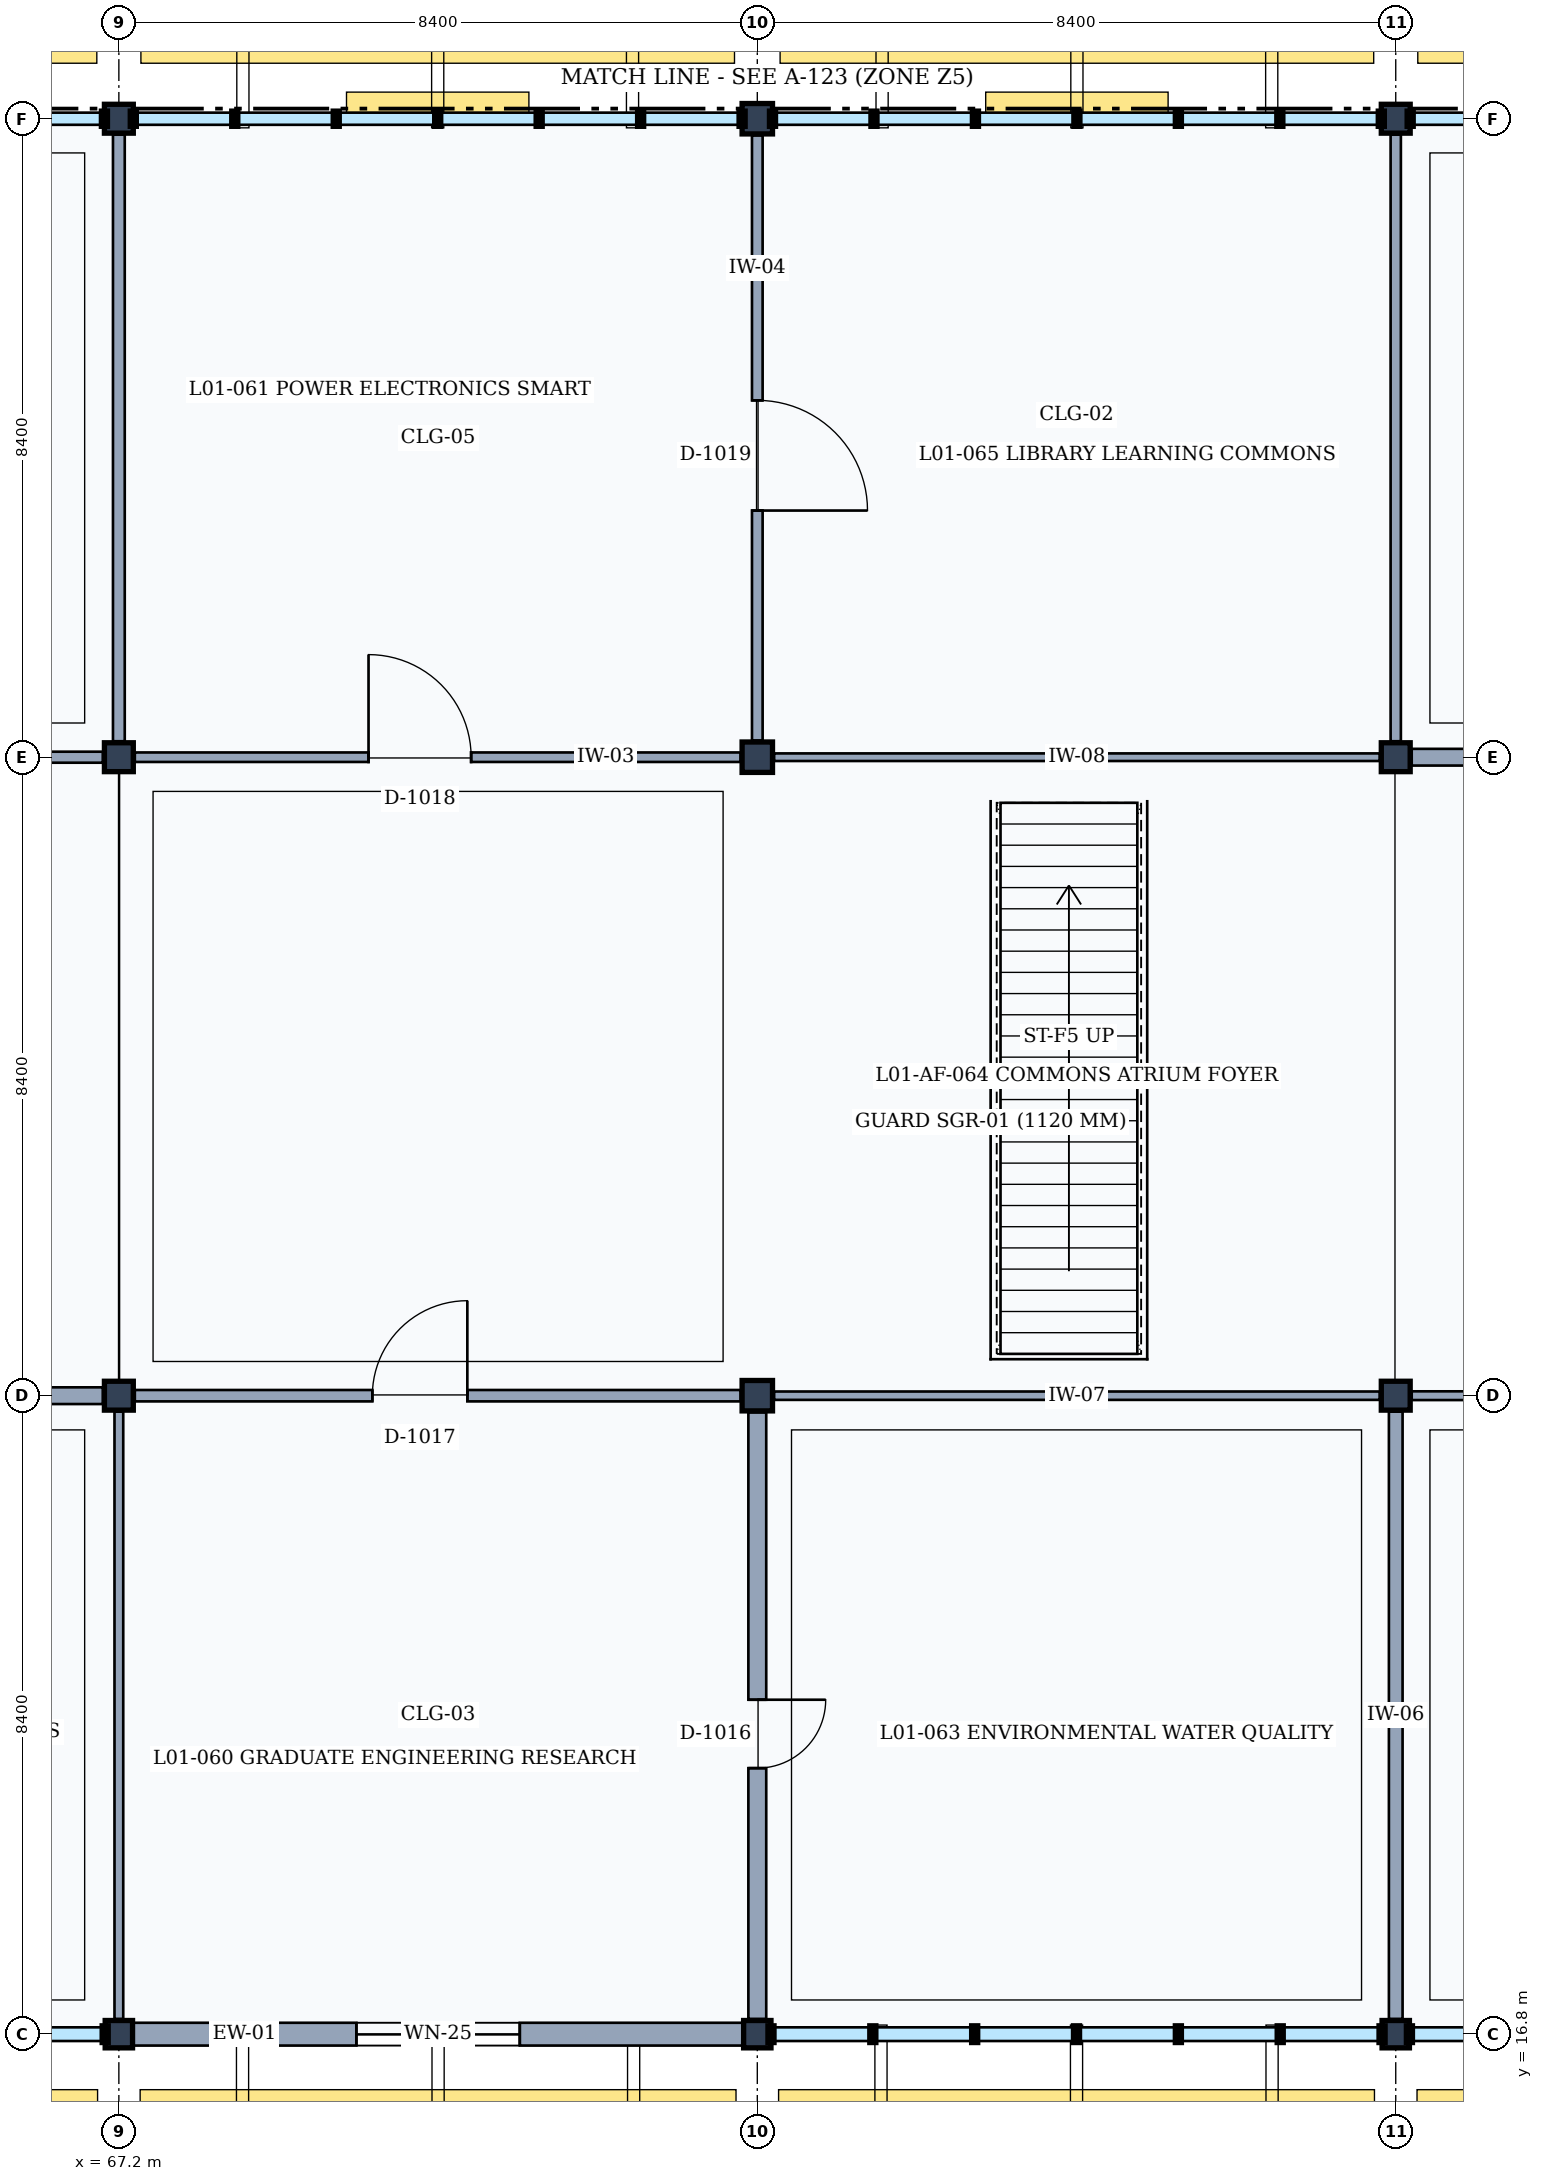
"""IFC4 building model, lengths in metres.
Left out: names, types, materials, properties, quantities, classifications, styles, units other than length and angle.
Written with IfcOpenShell. Run it as: python <this file> out.ifc"""

import sys

from ifc_helpers import new_model, si_unit, direction, frame, frame_2d, origin, origin_2d, place, context, subcontext, project, spatial, rectangle, extrude, element, fill, save


model = new_model("IFC4")
c1 = context("Model", 3, precision=1e-05, world=origin(), true_north=direction((0.0, 1.0)))
c2 = subcontext(c1, "Body", "Model", "MODEL_VIEW")
j1 = project(units=[si_unit("LENGTHUNIT", "METRE"), si_unit("PLANEANGLEUNIT", "RADIAN")], contexts=[c1])
p1 = place(None, origin())
s1 = spatial("IfcSite", under=j1, at=p1, CompositionType="ELEMENT")
p2 = place(p1, origin())
s2 = spatial("IfcBuilding", under=s1, at=p2, CompositionType="ELEMENT")
p3 = place(p2, frame((0.0, 0.0, 4.8)))
s3 = spatial("IfcBuildingStorey", under=s2, at=p3, CompositionType="ELEMENT", Elevation=4.8)
p4 = place(p3, frame((67.2, 16.8, 0.0), z_axis=(0.0, 0.0, 1.0), x_axis=(1.0, 0.0, 0.0)))
e1 = element("IfcColumn", 1, at=p4, inside=s3, PredefinedType="COLUMN", context=c2, shape_type="SweptSolid", body=[
    extrude(rectangle(XDim=0.36, YDim=0.36, at=origin_2d()), origin(), (0.0, 0.0, 1.0), 4.8),
])
for number, where, z_axis, x_axis in (
    (2, (67.2, 25.2, 0.0), (0.0, 0.0, 1.0), (1.0, 0.0, 0.0)),
    (3, (67.2, 33.6, 0.0), (0.0, 0.0, 1.0), (1.0, 0.0, 0.0)),
    (4, (67.2, 42.0, 0.0), (0.0, 0.0, 1.0), (1.0, 0.0, 0.0)),
):
    element("IfcColumn", number, at=place(p3, frame(where, z_axis=z_axis, x_axis=x_axis)), inside=s3, PredefinedType="COLUMN", context=c2, shape_type="SweptSolid", body=[
        extrude(rectangle(XDim=0.38, YDim=0.38, at=origin_2d()), origin(), (0.0, 0.0, 1.0), 4.8),
    ])
p5 = place(p3, frame((75.6, 16.8, 0.0), z_axis=(0.0, 0.0, 1.0), x_axis=(1.0, 0.0, 0.0)))
e5 = element("IfcColumn", 5, at=p5, inside=s3, PredefinedType="COLUMN", context=c2, shape_type="SweptSolid", body=[
    extrude(rectangle(XDim=0.36, YDim=0.36, at=origin_2d()), origin(), (0.0, 0.0, 1.0), 4.8),
])
for number, where, z_axis, x_axis in (
    (6, (75.6, 25.2, 0.0), (0.0, 0.0, 1.0), (1.0, 0.0, 0.0)),
    (7, (75.6, 33.6, 0.0), (0.0, 0.0, 1.0), (1.0, 0.0, 0.0)),
    (8, (75.6, 42.0, 0.0), (0.0, 0.0, 1.0), (1.0, 0.0, 0.0)),
):
    element("IfcColumn", number, at=place(p3, frame(where, z_axis=z_axis, x_axis=x_axis)), inside=s3, PredefinedType="COLUMN", context=c2, shape_type="SweptSolid", body=[
        extrude(rectangle(XDim=0.4, YDim=0.4, at=origin_2d()), origin(), (0.0, 0.0, 1.0), 4.8),
    ])
p6 = place(p3, frame((84.0, 16.8, 0.0), z_axis=(0.0, 0.0, 1.0), x_axis=(1.0, 0.0, 0.0)))
e9 = element("IfcColumn", 9, at=p6, inside=s3, PredefinedType="COLUMN", context=c2, shape_type="SweptSolid", body=[
    extrude(rectangle(XDim=0.36, YDim=0.36, at=origin_2d()), origin(), (0.0, 0.0, 1.0), 4.8),
])
for number, where, z_axis, x_axis in (
    (10, (84.0, 25.2, 0.0), (0.0, 0.0, 1.0), (1.0, 0.0, 0.0)),
    (11, (84.0, 33.6, 0.0), (0.0, 0.0, 1.0), (1.0, 0.0, 0.0)),
    (12, (84.0, 42.0, 0.0), (0.0, 0.0, 1.0), (1.0, 0.0, 0.0)),
):
    element("IfcColumn", number, at=place(p3, frame(where, z_axis=z_axis, x_axis=x_axis)), inside=s3, PredefinedType="COLUMN", context=c2, shape_type="SweptSolid", body=[
        extrude(rectangle(XDim=0.38, YDim=0.38, at=origin_2d()), origin(), (0.0, 0.0, 1.0), 4.8),
    ])
p7 = place(p3, frame((75.42, 16.8, 0.0), z_axis=(0.0, 0.0, 1.0), x_axis=(-1.0, 0.0, 0.0)))
e13 = element("IfcWall", 13, at=p7, inside=s3, PredefinedType="SOLIDWALL", context=c2, shape_type="SweptSolid", body=[
    extrude(rectangle(XDim=8.04, YDim=0.3, at=frame_2d((4.02, 0.0))), origin(), (0.0, 0.0, 1.0), 3.96),
])
p8 = place(p7, frame((2.945, 0.0, 0.9)))
e14 = element("IfcOpeningElement", 14, at=p8, cuts=e13, PredefinedType="OPENING", context=c2, shape_type="SweptSolid", body=[
    extrude(rectangle(XDim=2.15, YDim=1.85, at=frame_2d((1.075, 0.925))), frame((0.0, 0.16, 0.0), z_axis=(0.0, -1.0, 0.0), x_axis=(1.0, 0.0, 0.0)), (0.0, 0.0, 1.0), 0.32),
])
p9 = place(p3, frame((67.2, 17.0, 0.0), z_axis=(0.0, 0.0, 1.0), x_axis=(0.0, 1.0, 0.0)))
e15 = element("IfcWall", 15, at=p9, inside=s3, PredefinedType="PARTITIONING", context=c2, shape_type="SweptSolid", body=[
    extrude(rectangle(XDim=7.99, YDim=0.115, at=frame_2d((3.995, 0.0))), origin(), (0.0, 0.0, 1.0), 3.92),
])
p10 = place(p3, frame((59.03, 25.2, 0.0), z_axis=(0.0, 0.0, 1.0), x_axis=(1.0, 0.0, 0.0)))
e16 = element("IfcWall", 16, at=p10, inside=s3, PredefinedType="PARTITIONING", context=c2, shape_type="SweptSolid", body=[
    extrude(rectangle(XDim=7.96, YDim=0.22, at=frame_2d((3.98, 0.0))), origin(), (0.0, 0.0, 1.0), 3.89),
])
p11 = place(p3, frame((59.03, 33.6, 0.0), z_axis=(0.0, 0.0, 1.0), x_axis=(1.0, 0.0, 0.0)))
e17 = element("IfcWall", 17, at=p11, inside=s3, PredefinedType="PARTITIONING", context=c2, shape_type="SweptSolid", body=[
    extrude(rectangle(XDim=7.96, YDim=0.145, at=frame_2d((3.98, 0.0))), origin(), (0.0, 0.0, 1.0), 3.92),
])
p12 = place(p11, frame((2.9, 0.0, 0.0)))
e18 = element("IfcOpeningElement", 18, at=p12, cuts=e17, PredefinedType="OPENING", context=c2, shape_type="SweptSolid", body=[
    extrude(rectangle(XDim=1.7, YDim=2.3, at=frame_2d((0.85, 1.15))), frame((0.0, 0.083, 0.0), z_axis=(0.0, -1.0, 0.0), x_axis=(1.0, 0.0, 0.0)), (0.0, 0.0, 1.0), 0.165),
])
p13 = place(p3, frame((67.2, 33.81, 0.0), z_axis=(0.0, 0.0, 1.0), x_axis=(0.0, 1.0, 0.0)))
e19 = element("IfcWall", 19, at=p13, inside=s3, PredefinedType="PARTITIONING", context=c2, shape_type="SweptSolid", body=[
    extrude(rectangle(XDim=7.98, YDim=0.155, at=frame_2d((3.99, 0.0))), origin(), (0.0, 0.0, 1.0), 3.92),
])
p14 = place(p3, frame((75.6, 17.0, 0.0), z_axis=(0.0, 0.0, 1.0), x_axis=(0.0, 1.0, 0.0)))
e20 = element("IfcWall", 20, at=p14, inside=s3, PredefinedType="PARTITIONING", context=c2, shape_type="SweptSolid", body=[
    extrude(rectangle(XDim=7.98, YDim=0.235, at=frame_2d((3.99, 0.0))), origin(), (0.0, 0.0, 1.0), 3.92),
])
p15 = place(p14, frame((3.3, 0.0, 0.0)))
e21 = element("IfcOpeningElement", 21, at=p15, cuts=e20, PredefinedType="OPENING", context=c2, shape_type="SweptSolid", body=[
    extrude(rectangle(XDim=0.9, YDim=2.1, at=frame_2d((0.45, 1.05))), frame((0.0, 0.127, 0.0), z_axis=(0.0, -1.0, 0.0), x_axis=(1.0, 0.0, 0.0)), (0.0, 0.0, 1.0), 0.255),
])
p16 = place(p3, frame((67.41, 25.2, 0.0), z_axis=(0.0, 0.0, 1.0), x_axis=(1.0, 0.0, 0.0)))
e22 = element("IfcWall", 22, at=p16, inside=s3, PredefinedType="PARTITIONING", context=c2, shape_type="SweptSolid", body=[
    extrude(rectangle(XDim=7.97, YDim=0.15, at=frame_2d((3.985, 0.0))), origin(), (0.0, 0.0, 1.0), 3.89),
])
p17 = place(p16, frame((3.125, 0.0, 0.0)))
e23 = element("IfcOpeningElement", 23, at=p17, cuts=e22, PredefinedType="OPENING", context=c2, shape_type="SweptSolid", body=[
    extrude(rectangle(XDim=1.25, YDim=2.3, at=frame_2d((0.625, 1.15))), frame((0.0, 0.085, 0.0), z_axis=(0.0, -1.0, 0.0), x_axis=(1.0, 0.0, 0.0)), (0.0, 0.0, 1.0), 0.17),
])
p18 = place(p3, frame((67.41, 33.6, 0.0), z_axis=(0.0, 0.0, 1.0), x_axis=(1.0, 0.0, 0.0)))
e24 = element("IfcWall", 24, at=p18, inside=s3, PredefinedType="PARTITIONING", context=c2, shape_type="SweptSolid", body=[
    extrude(rectangle(XDim=7.97, YDim=0.125, at=frame_2d((3.985, 0.0))), origin(), (0.0, 0.0, 1.0), 3.92),
])
p19 = place(p18, frame((3.075, 0.0, 0.0)))
e25 = element("IfcOpeningElement", 25, at=p19, cuts=e24, PredefinedType="OPENING", context=c2, shape_type="SweptSolid", body=[
    extrude(rectangle(XDim=1.35, YDim=2.25, at=frame_2d((0.675, 1.125))), frame((0.0, 0.073, 0.0), z_axis=(0.0, -1.0, 0.0), x_axis=(1.0, 0.0, 0.0)), (0.0, 0.0, 1.0), 0.145),
])
p20 = place(p3, frame((75.6, 33.82, 0.0), z_axis=(0.0, 0.0, 1.0), x_axis=(0.0, 1.0, 0.0)))
e26 = element("IfcWall", 26, at=p20, inside=s3, PredefinedType="PARTITIONING", context=c2, shape_type="SweptSolid", body=[
    extrude(rectangle(XDim=7.96, YDim=0.14, at=frame_2d((3.98, 0.0))), origin(), (0.0, 0.0, 1.0), 3.92),
])
p21 = place(p20, frame((3.025, 0.0, 0.0)))
e27 = element("IfcOpeningElement", 27, at=p21, cuts=e26, PredefinedType="OPENING", context=c2, shape_type="SweptSolid", body=[
    extrude(rectangle(XDim=1.45, YDim=2.35, at=frame_2d((0.725, 1.175))), frame((0.0, 0.08, 0.0), z_axis=(0.0, -1.0, 0.0), x_axis=(1.0, 0.0, 0.0)), (0.0, 0.0, 1.0), 0.16),
])
p22 = place(p3, frame((84.0, 17.0, 0.0), z_axis=(0.0, 0.0, 1.0), x_axis=(0.0, 1.0, 0.0)))
e28 = element("IfcWall", 28, at=p22, inside=s3, PredefinedType="PARTITIONING", context=c2, shape_type="SweptSolid", body=[
    extrude(rectangle(XDim=7.99, YDim=0.18, at=frame_2d((3.995, 0.0))), origin(), (0.0, 0.0, 1.0), 3.92),
])
p23 = place(p3, frame((75.82, 25.2, 0.0), z_axis=(0.0, 0.0, 1.0), x_axis=(1.0, 0.0, 0.0)))
e29 = element("IfcWall", 29, at=p23, inside=s3, PredefinedType="PARTITIONING", context=c2, shape_type="SweptSolid", body=[
    extrude(rectangle(XDim=7.97, YDim=0.11, at=frame_2d((3.985, 0.0))), origin(), (0.0, 0.0, 1.0), 3.89),
])
p24 = place(p3, frame((75.82, 33.6, 0.0), z_axis=(0.0, 0.0, 1.0), x_axis=(1.0, 0.0, 0.0)))
e30 = element("IfcWall", 30, at=p24, inside=s3, PredefinedType="MOVABLE", context=c2, shape_type="SweptSolid", body=[
    extrude(rectangle(XDim=7.97, YDim=0.1, at=frame_2d((3.985, 0.0))), origin(), (0.0, 0.0, 1.0), 3.92),
])
p25 = place(p3, frame((84.0, 33.81, 0.0), z_axis=(0.0, 0.0, 1.0), x_axis=(0.0, 1.0, 0.0)))
e31 = element("IfcWall", 31, at=p25, inside=s3, PredefinedType="PARTITIONING", context=c2, shape_type="SweptSolid", body=[
    extrude(rectangle(XDim=7.98, YDim=0.135, at=frame_2d((3.99, 0.0))), origin(), (0.0, 0.0, 1.0), 3.92),
])
p26 = place(p3, frame((84.21, 25.2, 0.0), z_axis=(0.0, 0.0, 1.0), x_axis=(1.0, 0.0, 0.0)))
e32 = element("IfcWall", 32, at=p26, inside=s3, PredefinedType="PARTITIONING", context=c2, shape_type="SweptSolid", body=[
    extrude(rectangle(XDim=7.97, YDim=0.115, at=frame_2d((3.985, 0.0))), origin(), (0.0, 0.0, 1.0), 3.89),
])
p27 = place(p26, frame((3.275, 0.0, 0.0)))
e33 = element("IfcOpeningElement", 33, at=p27, cuts=e32, PredefinedType="OPENING", context=c2, shape_type="SweptSolid", body=[
    extrude(rectangle(XDim=0.95, YDim=2.15, at=frame_2d((0.475, 1.075))), frame((0.0, 0.067, 0.0), z_axis=(0.0, -1.0, 0.0), x_axis=(1.0, 0.0, 0.0)), (0.0, 0.0, 1.0), 0.135),
])
p28 = place(p3, frame((84.21, 33.6, 0.0), z_axis=(0.0, 0.0, 1.0), x_axis=(1.0, 0.0, 0.0)))
e34 = element("IfcWall", 34, at=p28, inside=s3, PredefinedType="PARTITIONING", context=c2, shape_type="SweptSolid", body=[
    extrude(rectangle(XDim=7.97, YDim=0.22, at=frame_2d((3.985, 0.0))), origin(), (0.0, 0.0, 1.0), 3.92),
])
p29 = place(p28, frame((2.85, 0.0, 0.0)))
e35 = element("IfcOpeningElement", 35, at=p29, cuts=e34, PredefinedType="OPENING", context=c2, shape_type="SweptSolid", body=[
    extrude(rectangle(XDim=1.8, YDim=2.3, at=frame_2d((0.9, 1.15))), frame((0.0, 0.12, 0.0), z_axis=(0.0, -1.0, 0.0), x_axis=(1.0, 0.0, 0.0)), (0.0, 0.0, 1.0), 0.24),
])
p30 = place(p8, origin())
e36 = element("IfcWindow", 36, at=p30, inside=s3, PartitioningType="SINGLE_PANEL", PredefinedType="WINDOW", context=c2, shape_type="SweptSolid", body=[
    extrude(rectangle(XDim=2.15, YDim=1.85, at=frame_2d((1.075, 0.925))), frame((0.0, 0.03, 0.0), z_axis=(0.0, -1.0, 0.0), x_axis=(1.0, 0.0, 0.0)), (0.0, 0.0, 1.0), 0.06),
])
fill(e14, e36)
p31 = place(p15, frame((0.9, 0.0, 0.0), z_axis=(0.0, 0.0, 1.0), x_axis=(-1.0, 0.0, 0.0)))
e37 = element("IfcDoor", 37, at=p31, inside=s3, OperationType="SINGLE_SWING_LEFT", PredefinedType="DOOR", context=c2, shape_type="SweptSolid", body=[
    extrude(rectangle(XDim=0.9, YDim=2.1, at=frame_2d((0.45, 1.05))), frame((0.0, 0.025, 0.0), z_axis=(0.0, -1.0, 0.0), x_axis=(1.0, 0.0, 0.0)), (0.0, 0.0, 1.0), 0.05),
])
fill(e21, e37)
p32 = place(p17, origin())
e38 = element("IfcDoor", 38, at=p32, inside=s3, OperationType="SINGLE_SWING_RIGHT", PredefinedType="DOOR", context=c2, shape_type="SweptSolid", body=[
    extrude(rectangle(XDim=1.25, YDim=2.3, at=frame_2d((0.625, 1.15))), frame((0.0, 0.025, 0.0), z_axis=(0.0, -1.0, 0.0), x_axis=(1.0, 0.0, 0.0)), (0.0, 0.0, 1.0), 0.05),
])
fill(e23, e38)
p33 = place(p19, origin())
e39 = element("IfcDoor", 39, at=p33, inside=s3, OperationType="SINGLE_SWING_LEFT", PredefinedType="DOOR", context=c2, shape_type="SweptSolid", body=[
    extrude(rectangle(XDim=1.35, YDim=2.25, at=frame_2d((0.675, 1.125))), frame((0.0, 0.025, 0.0), z_axis=(0.0, -1.0, 0.0), x_axis=(1.0, 0.0, 0.0)), (0.0, 0.0, 1.0), 0.05),
])
fill(e25, e39)
p34 = place(p21, frame((1.45, 0.0, 0.0), z_axis=(0.0, 0.0, 1.0), x_axis=(-1.0, 0.0, 0.0)))
e40 = element("IfcDoor", 40, at=p34, inside=s3, OperationType="SINGLE_SWING_RIGHT", PredefinedType="DOOR", context=c2, shape_type="SweptSolid", body=[
    extrude(rectangle(XDim=1.45, YDim=2.35, at=frame_2d((0.725, 1.175))), frame((0.0, 0.025, 0.0), z_axis=(0.0, -1.0, 0.0), x_axis=(1.0, 0.0, 0.0)), (0.0, 0.0, 1.0), 0.05),
])
fill(e27, e40)
save(model, sys.argv[1])
